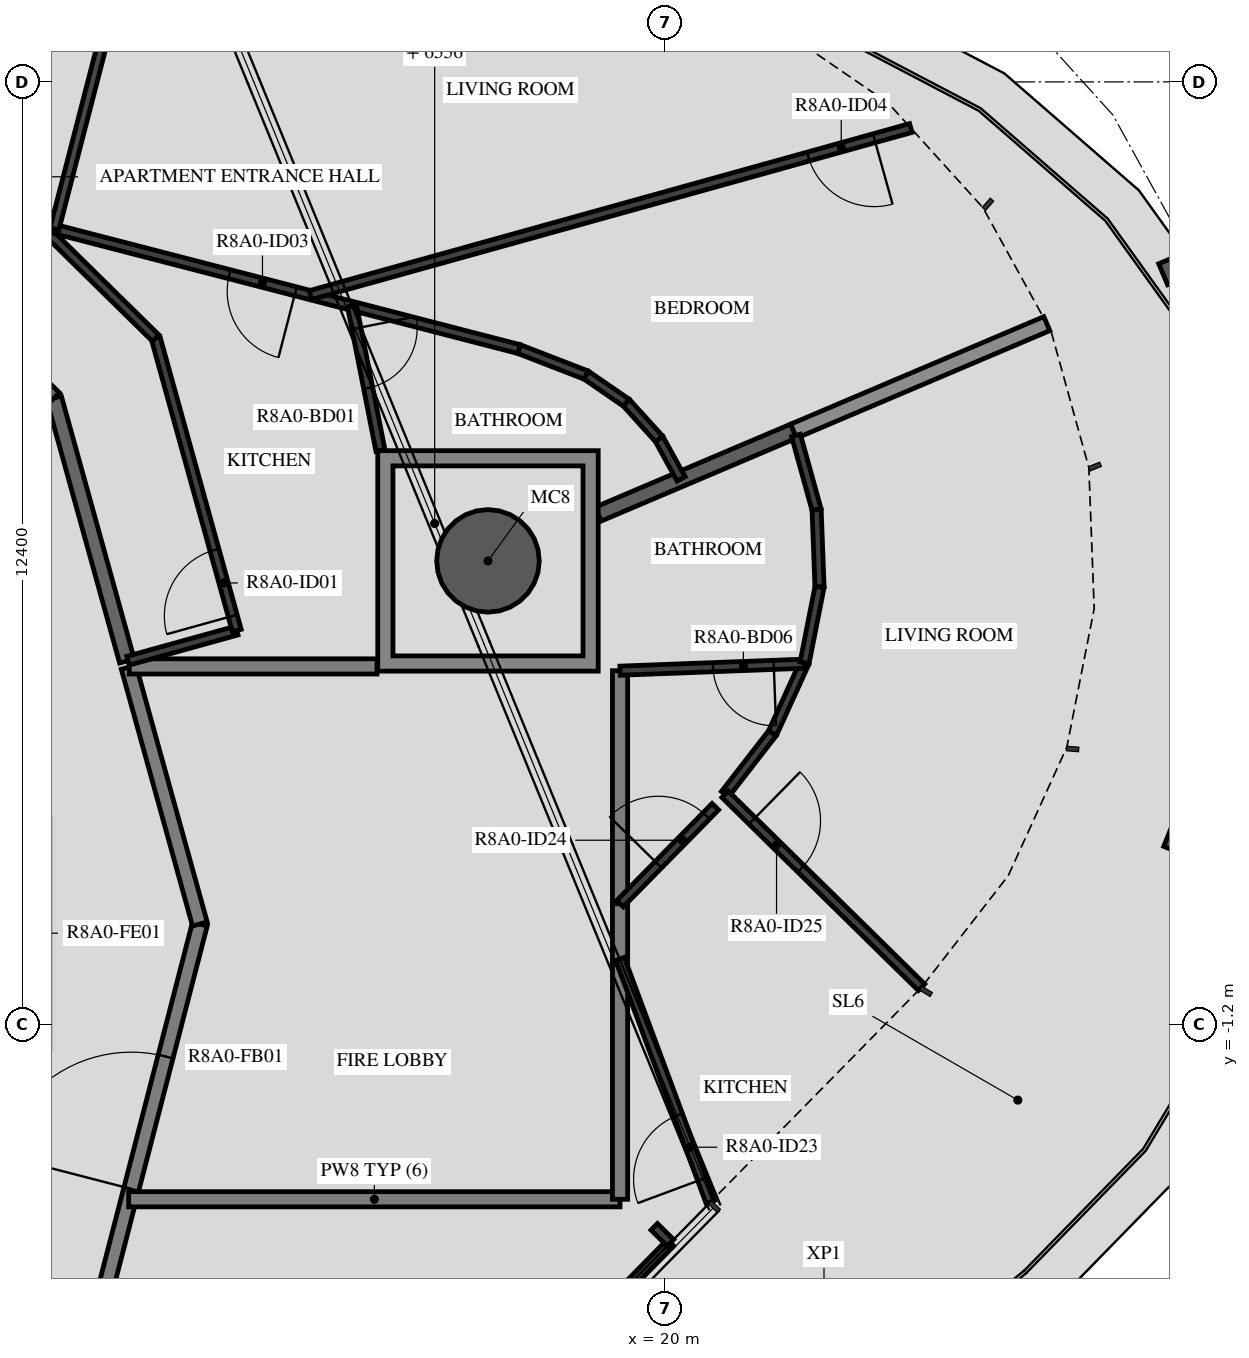
"""IFC4 building model, lengths in metres.
Left out: names, types, materials, properties, quantities, classifications, styles, units other than length and angle.
Written with IfcOpenShell. Run it as: python <this file> out.ifc"""

import sys

from ifc_helpers import new_model, si_unit, direction, frame, frame_2d, origin, origin_2d, place, context, subcontext, project, spatial, polyline, rectangle, hollow_circle, i_section, outline, extrude, element, fill, save


model = new_model("IFC4")
c1 = context("Model", 3, precision=1e-05, world=origin(), true_north=direction((0.0, 1.0)))
c2 = subcontext(c1, "Body", "Model", "MODEL_VIEW")
j1 = project(units=[si_unit("LENGTHUNIT", "METRE"), si_unit("PLANEANGLEUNIT", "RADIAN")], contexts=[c1])
p1 = place(None, origin())
s1 = spatial("IfcSite", under=j1, at=p1, CompositionType="ELEMENT")
p2 = place(p1, origin())
s2 = spatial("IfcBuilding", under=s1, at=p2, CompositionType="ELEMENT")
p3 = place(p2, frame((0.0, 0.0, 298.2)))
s3 = spatial("IfcBuildingStorey", under=s2, at=p3, CompositionType="ELEMENT", Elevation=298.2)
p4 = place(p3, frame((17.663, 4.898, -0.45), z_axis=(0.0, 0.0, 1.0), x_axis=(1.0, 0.0, 0.0)))
e1 = element("IfcColumn", 1, at=p4, inside=s3, PredefinedType="COLUMN", context=c2, shape_type="SweptSolid", body=[
    extrude(hollow_circle(Radius=0.675, WallThickness=0.03, at=origin_2d()), origin(), (0.0, 0.0, 1.0), 3.57),
])
for number, where, z_axis, x_axis in (
    (2, (27.026, 1.113, -0.45), (0.0, 0.0, 1.0), (-0.375, -0.927, 0.0)),
    (3, (26.96, 8.845, -0.45), (0.0, 0.0, 1.0), (0.391, -0.92, 0.0)),
):
    element("IfcColumn", number, at=place(p3, frame(where, z_axis=z_axis, x_axis=x_axis)), inside=s3, PredefinedType="COLUMN", context=c2, shape_type="SweptSolid", body=[
        extrude(i_section(OverallWidth=0.3, OverallDepth=0.9, WebThickness=0.019, FlangeThickness=0.035, FilletRadius=0.03, at=origin_2d()), origin(), (0.0, 0.0, 1.0), 3.57),
    ])
p5 = place(p3, frame((12.074, -6.831, 0.0), z_axis=(0.0, 0.0, 1.0), x_axis=(0.250391063186, 0.968144780225, 0.0)))
e4 = element("IfcWall", 4, at=p5, inside=s3, PredefinedType="STANDARD", context=c2, shape_type="SweptSolid", body=[
    extrude(rectangle(XDim=7.181, YDim=0.2, at=frame_2d((3.591, 0.0))), origin(), (0.0, 0.0, 1.0), 3.12),
])
p6 = place(p5, frame((3.581, 0.0, 0.0)))
e5 = element("IfcOpeningElement", 5, at=p6, cuts=e4, PredefinedType="OPENING", context=c2, shape_type="SweptSolid", body=[
    extrude(rectangle(XDim=1.8, YDim=2.1, at=frame_2d((0.9, 1.05))), frame((0.0, 0.11, 0.0), z_axis=(0.0, -1.0, 0.0), x_axis=(1.0, 0.0, 0.0)), (0.0, 0.0, 1.0), 0.22),
])
p7 = place(p3, frame((13.872, 0.121, 0.0), z_axis=(0.0, 0.0, 1.0), x_axis=(-0.267291928416, 0.963615600228, 0.0)))
e6 = element("IfcWall", 6, at=p7, inside=s3, PredefinedType="STANDARD", context=c2, shape_type="SweptSolid", body=[
    extrude(rectangle(XDim=3.507, YDim=0.2, at=frame_2d((1.753, 0.0))), origin(), (0.0, 0.0, 1.0), 3.12),
])
p8 = place(p3, frame((12.913, 3.581, 0.0), z_axis=(0.0, 0.0, 1.0), x_axis=(-0.267223005422, 0.963634715737, 0.0)))
e7 = element("IfcWall", 7, at=p8, inside=s3, PredefinedType="STANDARD", context=c2, shape_type="SweptSolid", body=[
    extrude(rectangle(XDim=3.591, YDim=0.2, at=frame_2d((1.795, 0.0))), origin(), (0.0, 0.0, 1.0), 3.12),
])
p9 = place(p3, frame((11.953, 7.041, 0.0), z_axis=(0.0, 0.0, 1.0), x_axis=(-0.713250549143, 0.70090916255, 0.0)))
e8 = element("IfcWall", 8, at=p9, inside=s3, PredefinedType="STANDARD", context=c2, shape_type="SweptSolid", body=[
    extrude(rectangle(XDim=7.181, YDim=0.2, at=frame_2d((3.59, 0.0))), origin(), (0.0, 0.0, 1.0), 3.12),
])
p10 = place(p9, frame((2.6, 0.0, 0.0)))
e9 = element("IfcOpeningElement", 9, at=p10, cuts=e8, PredefinedType="OPENING", context=c2, shape_type="SweptSolid", body=[
    extrude(rectangle(XDim=1.0, YDim=2.1, at=frame_2d((0.5, 1.05))), frame((0.0, 0.11, 0.0), z_axis=(0.0, -1.0, 0.0), x_axis=(1.0, 0.0, 0.0)), (0.0, 0.0, 1.0), 0.22),
])
p11 = place(p3, frame((16.203, 3.51, 0.0), z_axis=(0.0, 0.0, 1.0), x_axis=(-1.0, 0.0, 0.0)))
e10 = element("IfcWall", 10, at=p11, inside=s3, PredefinedType="STANDARD", context=c2, shape_type="SweptSolid", body=[
    extrude(rectangle(XDim=3.26, YDim=0.2, at=frame_2d((1.63, 0.0))), origin(), (0.0, 0.0, 1.0), 3.12),
])
p12 = place(p3, frame((12.936, -3.5, 0.0), z_axis=(0.0, 0.0, 1.0), x_axis=(1.0, 0.0, 0.0)))
e11 = element("IfcWall", 11, at=p12, inside=s3, PredefinedType="STANDARD", context=c2, shape_type="SweptSolid", body=[
    extrude(rectangle(XDim=6.464, YDim=0.2, at=frame_2d((3.232, 0.0))), origin(), (0.0, 0.0, 1.0), 3.12),
])
p13 = place(p3, frame((19.4, -3.5, 0.0), z_axis=(0.0, 0.0, 1.0), x_axis=(0.0, 1.0, 0.0)))
e12 = element("IfcWall", 12, at=p13, inside=s3, PredefinedType="STANDARD", context=c2, shape_type="SweptSolid", body=[
    extrude(rectangle(XDim=3.889, YDim=0.2, at=frame_2d((1.944, 0.0))), origin(), (0.0, 0.0, 1.0), 3.12),
])
p14 = place(p3, frame((19.4, 0.389, 0.0), z_axis=(0.0, 0.0, 1.0), x_axis=(0.0, 1.0, 0.0)))
e13 = element("IfcWall", 13, at=p14, inside=s3, PredefinedType="STANDARD", context=c2, shape_type="SweptSolid", body=[
    extrude(rectangle(XDim=3.065, YDim=0.2, at=frame_2d((1.533, 0.0))), origin(), (0.0, 0.0, 1.0), 3.12),
])
p15 = place(p3, frame((19.113, 5.514, 0.0), z_axis=(0.0, 0.0, 1.0), x_axis=(0.92047794988, 0.390794503268, 0.0)))
e14 = element("IfcWall", 14, at=p15, inside=s3, PredefinedType="STANDARD", context=c2, shape_type="SweptSolid", body=[
    extrude(rectangle(XDim=2.793, YDim=0.2, at=frame_2d((1.396, 0.0))), origin(), (0.0, 0.0, 1.0), 3.12),
])
p16 = place(p3, frame((21.684, 6.605, 0.0), z_axis=(0.0, 0.0, 1.0), x_axis=(0.920517820403, 0.390700578859, 0.0)))
e15 = element("IfcWall", 15, at=p16, inside=s3, PredefinedType="STANDARD", context=c2, shape_type="SweptSolid", body=[
    extrude(rectangle(XDim=3.619, YDim=0.2, at=frame_2d((1.809, 0.0))), origin(), (0.0, 0.0, 1.0), 2.73),
])
p17 = place(p3, frame((12.927, 3.585, 0.0), z_axis=(0.0, 0.0, 1.0), x_axis=(0.963616756608, 0.26728775951, 0.0)))
e16 = element("IfcWall", 16, at=p17, inside=s3, PredefinedType="PARTITIONING", context=c2, shape_type="SweptSolid", body=[
    extrude(rectangle(XDim=1.485, YDim=0.12, at=frame_2d((0.743, 0.0))), origin(), (0.0, 0.0, 1.0), 3.12),
])
p18 = place(p3, frame((14.358, 3.982, 0.0), z_axis=(0.0, 0.0, 1.0), x_axis=(-0.267233823916, 0.963631715623, 0.0)))
e17 = element("IfcWall", 17, at=p18, inside=s3, PredefinedType="PARTITIONING", context=c2, shape_type="SweptSolid", body=[
    extrude(rectangle(XDim=3.992, YDim=0.12, at=frame_2d((1.996, 0.0))), origin(), (0.0, 0.0, 1.0), 3.12),
])
p19 = place(p18, frame((0.2, 0.0, 0.0)))
e18 = element("IfcOpeningElement", 18, at=p19, cuts=e17, PredefinedType="OPENING", context=c2, shape_type="SweptSolid", body=[
    extrude(rectangle(XDim=0.9, YDim=2.1, at=frame_2d((0.45, 1.05))), frame((0.0, 0.07, 0.0), z_axis=(0.0, -1.0, 0.0), x_axis=(1.0, 0.0, 0.0)), (0.0, 0.0, 1.0), 0.14),
])
p20 = place(p3, frame((13.291, 7.829, 0.0), z_axis=(0.0, 0.0, 1.0), x_axis=(-0.713255978622, 0.700903637428, 0.0)))
e19 = element("IfcWall", 19, at=p20, inside=s3, PredefinedType="PARTITIONING", context=c2, shape_type="SweptSolid", body=[
    extrude(rectangle(XDim=7.985, YDim=0.12, at=frame_2d((3.992, 0.0))), origin(), (0.0, 0.0, 1.0), 3.12),
])
p21 = place(p20, frame((2.314, 0.0, 0.0)))
e20 = element("IfcOpeningElement", 20, at=p21, cuts=e19, PredefinedType="OPENING", context=c2, shape_type="SweptSolid", body=[
    extrude(rectangle(XDim=0.9, YDim=2.1, at=frame_2d((0.45, 1.05))), frame((0.0, 0.07, 0.0), z_axis=(0.0, -1.0, 0.0), x_axis=(1.0, 0.0, 0.0)), (0.0, 0.0, 1.0), 0.14),
])
p22 = place(p3, frame((20.203, 5.977, 0.0), z_axis=(0.0, 0.0, 1.0), x_axis=(-0.482261544721, 0.876027284098, 0.0)))
e21 = element("IfcWall", 21, at=p22, inside=s3, PredefinedType="PARTITIONING", context=c2, shape_type="SweptSolid", body=[
    extrude(rectangle(XDim=0.601, YDim=0.12, at=frame_2d((0.301, 0.0))), origin(), (0.0, 0.0, 1.0), 3.12),
])
for number, where, z_axis, x_axis in (
    (22, (19.913, 6.504, 0.0), (0.0, 0.0, 1.0), (-0.671, 0.741, 0.0)),
    (23, (19.482, 6.979, 0.0), (0.0, 0.0, 1.0), (-0.824, 0.566, 0.0)),
):
    element("IfcWall", number, at=place(p3, frame(where, z_axis=z_axis, x_axis=x_axis)), inside=s3, PredefinedType="PARTITIONING", context=c2, shape_type="SweptSolid", body=[
        extrude(rectangle(XDim=0.642, YDim=0.12, at=frame_2d((0.321, 0.0))), origin(), (0.0, 0.0, 1.0), 3.12),
    ])
p23 = place(p3, frame((18.953, 7.343, 0.0), z_axis=(0.0, 0.0, 1.0), x_axis=(-0.932458839957, 0.361276226433, 0.0)))
e24 = element("IfcWall", 24, at=p23, inside=s3, PredefinedType="PARTITIONING", context=c2, shape_type="SweptSolid", body=[
    extrude(rectangle(XDim=0.947, YDim=0.12, at=frame_2d((0.473, 0.0))), origin(), (0.0, 0.0, 1.0), 3.12),
])
p24 = place(p3, frame((18.071, 7.685, 0.0), z_axis=(0.0, 0.0, 1.0), x_axis=(-0.968152245082, 0.250362198309, 0.0)))
e25 = element("IfcWall", 25, at=p24, inside=s3, PredefinedType="PARTITIONING", context=c2, shape_type="SweptSolid", body=[
    extrude(rectangle(XDim=6.313, YDim=0.12, at=frame_2d((3.157, 0.0))), origin(), (0.0, 0.0, 1.0), 3.12),
])
p25 = place(p24, frame((3.036, 0.0, 0.0)))
e26 = element("IfcOpeningElement", 26, at=p25, cuts=e25, PredefinedType="OPENING", context=c2, shape_type="SweptSolid", body=[
    extrude(rectangle(XDim=0.9, YDim=2.1, at=frame_2d((0.45, 1.05))), frame((0.0, 0.07, 0.0), z_axis=(0.0, -1.0, 0.0), x_axis=(1.0, 0.0, 0.0)), (0.0, 0.0, 1.0), 0.14),
])
p26 = place(p3, frame((15.873, 8.253, 0.0), z_axis=(0.0, 0.0, 1.0), x_axis=(0.19340687816, -0.981118636802, 0.0)))
e27 = element("IfcWall", 27, at=p26, inside=s3, PredefinedType="PARTITIONING", context=c2, shape_type="SweptSolid", body=[
    extrude(rectangle(XDim=1.941, YDim=0.12, at=frame_2d((0.971, 0.0))), origin(), (0.0, 0.0, 1.0), 3.12),
])
p27 = place(p26, frame((0.3, 0.0, 0.0)))
e28 = element("IfcOpeningElement", 28, at=p27, cuts=e27, PredefinedType="OPENING", context=c2, shape_type="SweptSolid", body=[
    extrude(rectangle(XDim=0.8, YDim=2.1, at=frame_2d((0.4, 1.05))), frame((0.0, 0.07, 0.0), z_axis=(0.0, -1.0, 0.0), x_axis=(1.0, 0.0, 0.0)), (0.0, 0.0, 1.0), 0.14),
])
p28 = place(p3, frame((23.225, 10.593, 0.0), z_axis=(0.0, 0.0, 1.0), x_axis=(-0.963409492722, -0.268033858559, 0.0)))
e29 = element("IfcWall", 29, at=p28, inside=s3, PredefinedType="PARTITIONING", context=c2, shape_type="SweptSolid", body=[
    extrude(rectangle(XDim=8.2, YDim=0.12, at=frame_2d((4.1, 0.0))), origin(), (0.0, 0.0, 1.0), 3.12),
])
p29 = place(p28, frame((0.5, 0.0, 0.0)))
e30 = element("IfcOpeningElement", 30, at=p29, cuts=e29, PredefinedType="OPENING", context=c2, shape_type="SweptSolid", body=[
    extrude(rectangle(XDim=0.9, YDim=2.1, at=frame_2d((0.45, 1.05))), frame((0.0, 0.07, 0.0), z_axis=(0.0, -1.0, 0.0), x_axis=(1.0, 0.0, 0.0)), (0.0, 0.0, 1.0), 0.14),
])
p30 = place(p3, frame((13.26, 14.3, 0.0), z_axis=(0.0, 0.0, 1.0), x_axis=(-0.25038206324, -0.968147107834, 0.0)))
e31 = element("IfcWall", 31, at=p30, inside=s3, PredefinedType="PARTITIONING", context=c2, shape_type="SweptSolid", body=[
    extrude(rectangle(XDim=5.2, YDim=0.12, at=frame_2d((2.6, 0.0))), origin(), (0.0, 0.0, 1.0), 2.73),
])
p31 = place(p3, frame((19.18, -4.971, 0.0), z_axis=(0.0, 0.0, 1.0), x_axis=(0.700974030867, 0.713186797445, 0.0)))
e32 = element("IfcWall", 32, at=p31, inside=s3, PredefinedType="PARTITIONING", context=c2, shape_type="SweptSolid", body=[
    extrude(rectangle(XDim=1.26, YDim=0.12, at=frame_2d((0.63, 0.0))), origin(), (0.0, 0.0, 1.0), 3.12),
])
p32 = place(p3, frame((20.59, -3.537, 0.0), z_axis=(0.0, 0.0, 1.0), x_axis=(-0.348621180513, 0.937263715556, 0.0)))
e33 = element("IfcWall", 33, at=p32, inside=s3, PredefinedType="PARTITIONING", context=c2, shape_type="SweptSolid", body=[
    extrude(rectangle(XDim=3.413, YDim=0.12, at=frame_2d((1.706, 0.0))), origin(), (0.0, 0.0, 1.0), 3.12),
])
p33 = place(p32, frame((0.32, 0.0, 0.0)))
e34 = element("IfcOpeningElement", 34, at=p33, cuts=e33, PredefinedType="OPENING", context=c2, shape_type="SweptSolid", body=[
    extrude(rectangle(XDim=0.9, YDim=2.1, at=frame_2d((0.45, 1.05))), frame((0.0, 0.07, 0.0), z_axis=(0.0, -1.0, 0.0), x_axis=(1.0, 0.0, 0.0)), (0.0, 0.0, 1.0), 0.14),
])
p34 = place(p3, frame((20.781, 1.829, 0.0), z_axis=(0.0, 0.0, 1.0), x_axis=(0.613326972183, 0.789829111386, 0.0)))
e35 = element("IfcWall", 35, at=p34, inside=s3, PredefinedType="PARTITIONING", context=c2, shape_type="SweptSolid", body=[
    extrude(rectangle(XDim=1.02, YDim=0.12, at=frame_2d((0.51, 0.0))), origin(), (0.0, 0.0, 1.0), 3.12),
])
p35 = place(p3, frame((21.406, 2.634, 0.0), z_axis=(0.0, 0.0, 1.0), x_axis=(0.414726005229, 0.909946339399, 0.0)))
e36 = element("IfcWall", 36, at=p35, inside=s3, PredefinedType="PARTITIONING", context=c2, shape_type="SweptSolid", body=[
    extrude(rectangle(XDim=1.016, YDim=0.12, at=frame_2d((0.508, 0.0))), origin(), (0.0, 0.0, 1.0), 3.12),
])
p36 = place(p3, frame((21.822, 3.545, 0.0), z_axis=(0.0, 0.0, 1.0), x_axis=(-0.999286397149, -0.037771635816, 0.0)))
e37 = element("IfcWall", 37, at=p36, inside=s3, PredefinedType="PARTITIONING", context=c2, shape_type="SweptSolid", body=[
    extrude(rectangle(XDim=2.424, YDim=0.12, at=frame_2d((1.212, 0.0))), origin(), (0.0, 0.0, 1.0), 3.12),
])
p37 = place(p36, frame((0.4, 0.0, 0.0)))
e38 = element("IfcOpeningElement", 38, at=p37, cuts=e37, PredefinedType="OPENING", context=c2, shape_type="SweptSolid", body=[
    extrude(rectangle(XDim=0.8, YDim=2.1, at=frame_2d((0.4, 1.05))), frame((0.0, 0.07, 0.0), z_axis=(0.0, -1.0, 0.0), x_axis=(1.0, 0.0, 0.0)), (0.0, 0.0, 1.0), 0.14),
])
p38 = place(p3, frame((19.4, 0.389, 0.0), z_axis=(0.0, 0.0, 1.0), x_axis=(0.700870484553, 0.713288555833, 0.0)))
e39 = element("IfcWall", 39, at=p38, inside=s3, PredefinedType="PARTITIONING", context=c2, shape_type="SweptSolid", body=[
    extrude(rectangle(XDim=1.789, YDim=0.12, at=frame_2d((0.895, 0.0))), origin(), (0.0, 0.0, 1.0), 3.12),
])
p39 = place(p38, frame((0.72, 0.0, 0.0)))
e40 = element("IfcOpeningElement", 40, at=p39, cuts=e39, PredefinedType="OPENING", context=c2, shape_type="SweptSolid", body=[
    extrude(rectangle(XDim=0.9, YDim=2.1, at=frame_2d((0.45, 1.05))), frame((0.0, 0.07, 0.0), z_axis=(0.0, -1.0, 0.0), x_axis=(1.0, 0.0, 0.0)), (0.0, 0.0, 1.0), 0.14),
])
for number, where, z_axis, x_axis in (
    (41, (21.715, 6.549, 0.0), (0.0, 0.0, 1.0), (0.267, -0.964, 0.0)),
    (42, (21.986, 5.57, 0.0), (0.0, 0.0, 1.0), (0.038, -0.999, 0.0)),
    (43, (22.025, 4.555, 0.0), (0.0, 0.0, 1.0), (-0.194, -0.981, 0.0)),
):
    element("IfcWall", number, at=place(p3, frame(where, z_axis=z_axis, x_axis=x_axis)), inside=s3, PredefinedType="PARTITIONING", context=c2, shape_type="SweptSolid", body=[
        extrude(rectangle(XDim=1.016, YDim=0.12, at=frame_2d((0.508, 0.0))), origin(), (0.0, 0.0, 1.0), 3.12),
    ])
p40 = place(p3, frame((20.781, 1.829, 0.0), z_axis=(0.0, 0.0, 1.0), x_axis=(0.713277344744, -0.700881894099, 0.0)))
e44 = element("IfcWall", 44, at=p40, inside=s3, PredefinedType="PARTITIONING", context=c2, shape_type="SweptSolid", body=[
    extrude(rectangle(XDim=3.624, YDim=0.12, at=frame_2d((1.812, 0.0))), origin(), (0.0, 0.0, 1.0), 3.12),
])
p41 = place(p40, frame((0.5, 0.0, 0.0)))
e45 = element("IfcOpeningElement", 45, at=p41, cuts=e44, PredefinedType="OPENING", context=c2, shape_type="SweptSolid", body=[
    extrude(rectangle(XDim=0.9, YDim=2.1, at=frame_2d((0.45, 1.05))), frame((0.0, 0.07, 0.0), z_axis=(0.0, -1.0, 0.0), x_axis=(1.0, 0.0, 0.0)), (0.0, 0.0, 1.0), 0.14),
])
p42 = place(p3, frame((20.063, -4.073, 0.0), z_axis=(0.0, 0.0, 1.0), x_axis=(-0.7135861572, 0.700567481584, 0.0)))
e46 = element("IfcWall", 46, at=p42, inside=s3, PredefinedType="PARTITIONING", context=c2, shape_type="SweptSolid", body=[
    extrude(rectangle(XDim=0.3, YDim=0.12, at=frame_2d((0.15, 0.0))), origin(), (0.0, 0.0, 1.0), 3.12),
])
p43 = place(p3, origin())
e47 = element("IfcWall", 47, at=p43, inside=s3, PredefinedType="STANDARD", context=c2, shape_type="SweptSolid", body=[
    extrude(outline(polyline([(19.113, 6.348), (19.113, 3.448), (16.213, 3.448), (16.213, 6.348), (19.113, 6.348)]), holes=[polyline([(16.413, 3.648), (18.913, 3.648), (18.913, 6.148), (16.413, 6.148), (16.413, 3.648)])]), origin(), (0.0, 0.0, 1.0), 3.12),
])
p44 = place(p19, origin())
e48 = element("IfcDoor", 48, at=p44, inside=s3, OperationType="SINGLE_SWING_LEFT", PredefinedType="DOOR", context=c2, shape_type="SweptSolid", body=[
    extrude(rectangle(XDim=0.9, YDim=2.1, at=frame_2d((0.45, 1.05))), frame((0.0, 0.025, 0.0), z_axis=(0.0, -1.0, 0.0), x_axis=(1.0, 0.0, 0.0)), (0.0, 0.0, 1.0), 0.05),
])
fill(e18, e48)
p45 = place(p27, origin())
e49 = element("IfcDoor", 49, at=p45, inside=s3, OperationType="SINGLE_SWING_LEFT", PredefinedType="DOOR", context=c2, shape_type="SweptSolid", body=[
    extrude(rectangle(XDim=0.8, YDim=2.1, at=frame_2d((0.4, 1.05))), frame((0.0, 0.025, 0.0), z_axis=(0.0, -1.0, 0.0), x_axis=(1.0, 0.0, 0.0)), (0.0, 0.0, 1.0), 0.05),
])
fill(e28, e49)
p46 = place(p25, origin())
e50 = element("IfcDoor", 50, at=p46, inside=s3, OperationType="SINGLE_SWING_LEFT", PredefinedType="DOOR", context=c2, shape_type="SweptSolid", body=[
    extrude(rectangle(XDim=0.9, YDim=2.1, at=frame_2d((0.45, 1.05))), frame((0.0, 0.025, 0.0), z_axis=(0.0, -1.0, 0.0), x_axis=(1.0, 0.0, 0.0)), (0.0, 0.0, 1.0), 0.05),
])
fill(e26, e50)
p47 = place(p29, origin())
e51 = element("IfcDoor", 51, at=p47, inside=s3, OperationType="SINGLE_SWING_LEFT", PredefinedType="DOOR", context=c2, shape_type="SweptSolid", body=[
    extrude(rectangle(XDim=0.9, YDim=2.1, at=frame_2d((0.45, 1.05))), frame((0.0, 0.025, 0.0), z_axis=(0.0, -1.0, 0.0), x_axis=(1.0, 0.0, 0.0)), (0.0, 0.0, 1.0), 0.05),
])
fill(e30, e51)
p48 = place(p33, origin())
e52 = element("IfcDoor", 52, at=p48, inside=s3, OperationType="SINGLE_SWING_RIGHT", PredefinedType="DOOR", context=c2, shape_type="SweptSolid", body=[
    extrude(rectangle(XDim=0.9, YDim=2.1, at=frame_2d((0.45, 1.05))), frame((0.0, 0.025, 0.0), z_axis=(0.0, -1.0, 0.0), x_axis=(1.0, 0.0, 0.0)), (0.0, 0.0, 1.0), 0.05),
])
fill(e34, e52)
p49 = place(p39, origin())
e53 = element("IfcDoor", 53, at=p49, inside=s3, OperationType="SINGLE_SWING_LEFT", PredefinedType="DOOR", context=c2, shape_type="SweptSolid", body=[
    extrude(rectangle(XDim=0.9, YDim=2.1, at=frame_2d((0.45, 1.05))), frame((0.0, 0.025, 0.0), z_axis=(0.0, -1.0, 0.0), x_axis=(1.0, 0.0, 0.0)), (0.0, 0.0, 1.0), 0.05),
])
fill(e40, e53)
p50 = place(p37, origin())
e54 = element("IfcDoor", 54, at=p50, inside=s3, OperationType="SINGLE_SWING_RIGHT", PredefinedType="DOOR", context=c2, shape_type="SweptSolid", body=[
    extrude(rectangle(XDim=0.8, YDim=2.1, at=frame_2d((0.4, 1.05))), frame((0.0, 0.025, 0.0), z_axis=(0.0, -1.0, 0.0), x_axis=(1.0, 0.0, 0.0)), (0.0, 0.0, 1.0), 0.05),
])
fill(e38, e54)
p51 = place(p41, origin())
e55 = element("IfcDoor", 55, at=p51, inside=s3, OperationType="SINGLE_SWING_RIGHT", PredefinedType="DOOR", context=c2, shape_type="SweptSolid", body=[
    extrude(rectangle(XDim=0.9, YDim=2.1, at=frame_2d((0.45, 1.05))), frame((0.0, 0.025, 0.0), z_axis=(0.0, -1.0, 0.0), x_axis=(1.0, 0.0, 0.0)), (0.0, 0.0, 1.0), 0.05),
])
fill(e45, e55)
p52 = place(p6, origin())
e56 = element("IfcDoor", 56, at=p52, inside=s3, OperationType="DOUBLE_DOOR_SINGLE_SWING", PredefinedType="DOOR", context=c2, shape_type="SweptSolid", body=[
    extrude(rectangle(XDim=1.8, YDim=2.1, at=frame_2d((0.9, 1.05))), frame((0.0, 0.025, 0.0), z_axis=(0.0, -1.0, 0.0), x_axis=(1.0, 0.0, 0.0)), (0.0, 0.0, 1.0), 0.05),
])
fill(e5, e56)
save(model, sys.argv[1])
